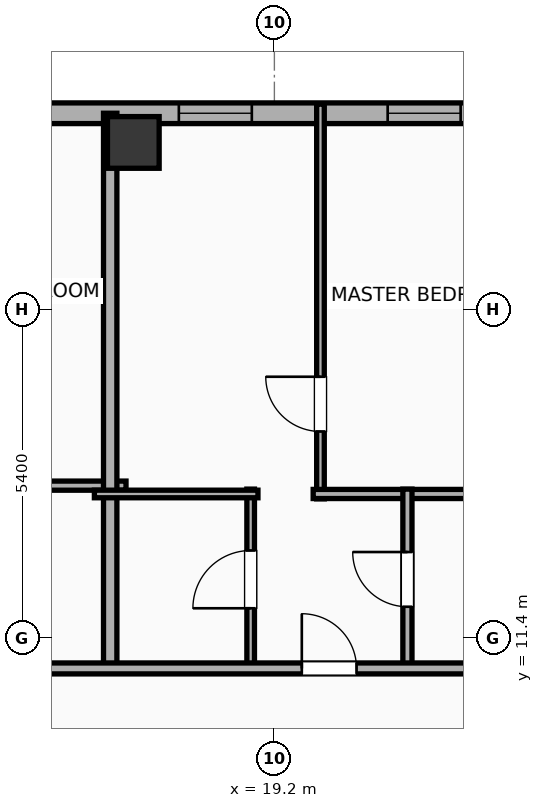
"""IFC4 building model, lengths in metres.
Left out: names, types, materials, properties, quantities, classifications, styles, units other than length and angle.
Written with IfcOpenShell. Run it as: python <this file> out.ifc"""

import sys

from ifc_helpers import new_model, si_unit, direction, frame, frame_2d, origin, origin_2d, place, context, subcontext, project, spatial, rectangle, hollow_rectangle, extrude, element, fill, save


model = new_model("IFC4")
c1 = context("Model", 3, precision=1e-05, world=origin(), true_north=direction((0.0, 1.0)))
c2 = subcontext(c1, "Body", "Model", "MODEL_VIEW")
j1 = project(units=[si_unit("LENGTHUNIT", "METRE"), si_unit("PLANEANGLEUNIT", "RADIAN")], contexts=[c1])
p1 = place(None, origin())
s1 = spatial("IfcSite", under=j1, at=p1, CompositionType="ELEMENT")
p2 = place(p1, origin())
s2 = spatial("IfcBuilding", under=s1, at=p2, CompositionType="ELEMENT")
p3 = place(p2, frame((0.0, 0.0, 243.1)))
s3 = spatial("IfcBuildingStorey", under=s2, at=p3, CompositionType="ELEMENT", Elevation=243.1)
p4 = place(p3, frame((16.88, 19.55, 0.0), z_axis=(0.0, 0.0, 1.0), x_axis=(1.0, 0.0, 0.0)))
e1 = element("IfcColumn", 1, at=p4, inside=s3, PredefinedType="COLUMN", context=c2, shape_type="SweptSolid", body=[
    extrude(hollow_rectangle(XDim=0.85, YDim=0.85, WallThickness=0.028, at=origin_2d()), origin(), (0.0, 0.0, 1.0), 3.9),
])
p5 = place(p3, frame((-22.783, 20.03, 0.0), z_axis=(0.0, 0.0, 1.0), x_axis=(1.0, 0.0, 0.0)))
e2 = element("IfcWall", 2, at=p5, inside=s3, PredefinedType="ELEMENTEDWALL", context=c2, shape_type="SweptSolid", body=[
    extrude(rectangle(XDim=49.566, YDim=0.34, at=frame_2d((24.783, 0.0))), origin(), (0.0, 0.0, 1.0), 3.65),
])
p6 = place(p5, frame((6.211, 0.0, 0.75)))
e3 = element("IfcOpeningElement", 3, at=p6, cuts=e2, PredefinedType="OPENING", context=c2, shape_type="SweptSolid", body=[
    extrude(rectangle(XDim=2.4, YDim=2.1, at=frame_2d((1.2, 1.05))), frame((0.0, 0.18, 0.0), z_axis=(0.0, -1.0, 0.0), x_axis=(1.0, 0.0, 0.0)), (0.0, 0.0, 1.0), 0.36),
])
p7 = place(p5, frame((25.233, 0.0, 0.75)))
e4 = element("IfcOpeningElement", 4, at=p7, cuts=e2, PredefinedType="OPENING", context=c2, shape_type="SweptSolid", body=[
    extrude(rectangle(XDim=2.4, YDim=2.1, at=frame_2d((1.2, 1.05))), frame((0.0, 0.18, 0.0), z_axis=(0.0, -1.0, 0.0), x_axis=(1.0, 0.0, 0.0)), (0.0, 0.0, 1.0), 0.36),
])
p8 = place(p5, frame((3.511, 0.0, 0.75)))
e5 = element("IfcOpeningElement", 5, at=p8, cuts=e2, PredefinedType="OPENING", context=c2, shape_type="SweptSolid", body=[
    extrude(rectangle(XDim=1.2, YDim=2.05, at=frame_2d((0.6, 1.025))), frame((0.0, 0.18, 0.0), z_axis=(0.0, -1.0, 0.0), x_axis=(1.0, 0.0, 0.0)), (0.0, 0.0, 1.0), 0.36),
])
p9 = place(p5, frame((10.728, 0.0, 0.75)))
e6 = element("IfcOpeningElement", 6, at=p9, cuts=e2, PredefinedType="OPENING", context=c2, shape_type="SweptSolid", body=[
    extrude(rectangle(XDim=1.2, YDim=2.05, at=frame_2d((0.6, 1.025))), frame((0.0, 0.18, 0.0), z_axis=(0.0, -1.0, 0.0), x_axis=(1.0, 0.0, 0.0)), (0.0, 0.0, 1.0), 0.36),
])
p10 = place(p5, frame((14.478, 0.0, 0.75)))
e7 = element("IfcOpeningElement", 7, at=p10, cuts=e2, PredefinedType="OPENING", context=c2, shape_type="SweptSolid", body=[
    extrude(rectangle(XDim=1.2, YDim=2.05, at=frame_2d((0.6, 1.025))), frame((0.0, 0.18, 0.0), z_axis=(0.0, -1.0, 0.0), x_axis=(1.0, 0.0, 0.0)), (0.0, 0.0, 1.0), 0.36),
])
p11 = place(p5, frame((17.988, 0.0, 0.75)))
e8 = element("IfcOpeningElement", 8, at=p11, cuts=e2, PredefinedType="OPENING", context=c2, shape_type="SweptSolid", body=[
    extrude(rectangle(XDim=1.2, YDim=2.05, at=frame_2d((0.6, 1.025))), frame((0.0, 0.18, 0.0), z_axis=(0.0, -1.0, 0.0), x_axis=(1.0, 0.0, 0.0)), (0.0, 0.0, 1.0), 0.36),
])
p12 = place(p5, frame((21.978, 0.0, 0.75)))
e9 = element("IfcOpeningElement", 9, at=p12, cuts=e2, PredefinedType="OPENING", context=c2, shape_type="SweptSolid", body=[
    extrude(rectangle(XDim=1.2, YDim=2.05, at=frame_2d((0.6, 1.025))), frame((0.0, 0.18, 0.0), z_axis=(0.0, -1.0, 0.0), x_axis=(1.0, 0.0, 0.0)), (0.0, 0.0, 1.0), 0.36),
])
p13 = place(p5, frame((30.373, 0.0, 0.75)))
e10 = element("IfcOpeningElement", 10, at=p13, cuts=e2, PredefinedType="OPENING", context=c2, shape_type="SweptSolid", body=[
    extrude(rectangle(XDim=0.85, YDim=2.05, at=frame_2d((0.425, 1.025))), frame((0.0, 0.18, 0.0), z_axis=(0.0, -1.0, 0.0), x_axis=(1.0, 0.0, 0.0)), (0.0, 0.0, 1.0), 0.36),
])
p14 = place(p5, frame((33.228, 0.0, 0.75)))
e11 = element("IfcOpeningElement", 11, at=p14, cuts=e2, PredefinedType="OPENING", context=c2, shape_type="SweptSolid", body=[
    extrude(rectangle(XDim=1.2, YDim=2.05, at=frame_2d((0.6, 1.025))), frame((0.0, 0.18, 0.0), z_axis=(0.0, -1.0, 0.0), x_axis=(1.0, 0.0, 0.0)), (0.0, 0.0, 1.0), 0.36),
])
p15 = place(p5, frame((36.978, 0.0, 0.75)))
e12 = element("IfcOpeningElement", 12, at=p15, cuts=e2, PredefinedType="OPENING", context=c2, shape_type="SweptSolid", body=[
    extrude(rectangle(XDim=1.2, YDim=2.05, at=frame_2d((0.6, 1.025))), frame((0.0, 0.18, 0.0), z_axis=(0.0, -1.0, 0.0), x_axis=(1.0, 0.0, 0.0)), (0.0, 0.0, 1.0), 0.36),
])
p16 = place(p5, frame((40.412, 0.0, 0.75)))
e13 = element("IfcOpeningElement", 13, at=p16, cuts=e2, PredefinedType="OPENING", context=c2, shape_type="SweptSolid", body=[
    extrude(rectangle(XDim=1.2, YDim=2.05, at=frame_2d((0.6, 1.025))), frame((0.0, 0.18, 0.0), z_axis=(0.0, -1.0, 0.0), x_axis=(1.0, 0.0, 0.0)), (0.0, 0.0, 1.0), 0.36),
])
p17 = place(p5, frame((43.846, 0.0, 0.75)))
e14 = element("IfcOpeningElement", 14, at=p17, cuts=e2, PredefinedType="OPENING", context=c2, shape_type="SweptSolid", body=[
    extrude(rectangle(XDim=1.2, YDim=2.05, at=frame_2d((0.6, 1.025))), frame((0.0, 0.18, 0.0), z_axis=(0.0, -1.0, 0.0), x_axis=(1.0, 0.0, 0.0)), (0.0, 0.0, 1.0), 0.36),
])
p18 = place(p5, frame((46.814, 0.0, 0.75)))
e15 = element("IfcOpeningElement", 15, at=p18, cuts=e2, PredefinedType="OPENING", context=c2, shape_type="SweptSolid", body=[
    extrude(rectangle(XDim=1.2, YDim=2.05, at=frame_2d((0.6, 1.025))), frame((0.0, 0.18, 0.0), z_axis=(0.0, -1.0, 0.0), x_axis=(1.0, 0.0, 0.0)), (0.0, 0.0, 1.0), 0.36),
])
p19 = place(p3, frame((12.97, 13.906, 0.0), z_axis=(0.0, 0.0, 1.0), x_axis=(1.0, 0.0, 0.0)))
e16 = element("IfcWall", 16, at=p19, inside=s3, PredefinedType="PLUMBINGWALL", context=c2, shape_type="SweptSolid", body=[
    extrude(rectangle(XDim=3.79, YDim=0.15, at=frame_2d((1.895, 0.0))), origin(), (0.0, 0.0, 1.0), 3.65),
])
p20 = place(p3, frame((16.5, 10.82, 0.0), z_axis=(0.0, 0.0, 1.0), x_axis=(0.0, 1.0, 0.0)))
e17 = element("IfcWall", 17, at=p20, inside=s3, PredefinedType="PARTITIONING", context=c2, shape_type="SweptSolid", body=[
    extrude(rectangle(XDim=9.21, YDim=0.22, at=frame_2d((4.605, 0.0))), origin(), (0.0, 0.0, 1.0), 3.09),
])
p21 = place(p3, frame((19.958, 13.689, 0.0), z_axis=(0.0, 0.0, 1.0), x_axis=(0.0, 1.0, 0.0)))
e18 = element("IfcWall", 18, at=p21, inside=s3, PredefinedType="PARTITIONING", context=c2, shape_type="SweptSolid", body=[
    extrude(rectangle(XDim=6.491, YDim=0.125, at=frame_2d((3.246, 0.0))), origin(), (0.0, 0.0, 1.0), 3.65),
])
p22 = place(p21, frame((1.108, 0.0, 0.0)))
e19 = element("IfcOpeningElement", 19, at=p22, cuts=e18, PredefinedType="OPENING", context=c2, shape_type="SweptSolid", body=[
    extrude(rectangle(XDim=0.9, YDim=2.05, at=frame_2d((0.45, 1.025))), frame((0.0, 0.073, 0.0), z_axis=(0.0, -1.0, 0.0), x_axis=(1.0, 0.0, 0.0)), (0.0, 0.0, 1.0), 0.145),
])
p23 = place(p3, frame((19.838, 13.769, 0.0), z_axis=(0.0, 0.0, 1.0), x_axis=(1.0, 0.0, 0.0)))
e20 = element("IfcWall", 20, at=p23, inside=s3, PredefinedType="PLUMBINGWALL", context=c2, shape_type="SweptSolid", body=[
    extrude(rectangle(XDim=3.79, YDim=0.15, at=frame_2d((1.895, 0.0))), origin(), (0.0, 0.0, 1.0), 3.65),
])
p24 = place(p3, frame((18.81, 10.88, 0.0), z_axis=(0.0, 0.0, 1.0), x_axis=(0.0, 1.0, 0.0)))
e21 = element("IfcWall", 21, at=p24, inside=s3, PredefinedType="PARTITIONING", context=c2, shape_type="SweptSolid", body=[
    extrude(rectangle(XDim=2.969, YDim=0.125, at=frame_2d((1.485, 0.0))), origin(), (0.0, 0.0, 1.0), 3.65),
])
p25 = place(p24, frame((1.01, 0.0, 0.0)))
e22 = element("IfcOpeningElement", 22, at=p25, cuts=e21, PredefinedType="OPENING", context=c2, shape_type="SweptSolid", body=[
    extrude(rectangle(XDim=0.95, YDim=2.05, at=frame_2d((0.475, 1.025))), frame((0.0, 0.073, 0.0), z_axis=(0.0, -1.0, 0.0), x_axis=(1.0, 0.0, 0.0)), (0.0, 0.0, 1.0), 0.145),
])
p26 = place(p3, frame((16.24, 13.769, 0.0), z_axis=(0.0, 0.0, 1.0), x_axis=(1.0, 0.0, 0.0)))
e23 = element("IfcWall", 23, at=p26, inside=s3, PredefinedType="PARTITIONING", context=c2, shape_type="SweptSolid", body=[
    extrude(rectangle(XDim=2.69, YDim=0.125, at=frame_2d((1.345, 0.0))), origin(), (0.0, 0.0, 1.0), 3.65),
])
p27 = place(p3, frame((21.388, 10.88, 0.0), z_axis=(0.0, 0.0, 1.0), x_axis=(0.0, 1.0, 0.0)))
e24 = element("IfcWall", 24, at=p27, inside=s3, PredefinedType="PLUMBINGWALL", context=c2, shape_type="SweptSolid", body=[
    extrude(rectangle(XDim=2.969, YDim=0.15, at=frame_2d((1.485, 0.0))), origin(), (0.0, 0.0, 1.0), 3.65),
])
p28 = place(p27, frame((1.034, 0.0, 0.0)))
e25 = element("IfcOpeningElement", 25, at=p28, cuts=e24, PredefinedType="OPENING", context=c2, shape_type="SweptSolid", body=[
    extrude(rectangle(XDim=0.9, YDim=2.05, at=frame_2d((0.45, 1.025))), frame((0.0, 0.085, 0.0), z_axis=(0.0, -1.0, 0.0), x_axis=(1.0, 0.0, 0.0)), (0.0, 0.0, 1.0), 0.17),
])
p29 = place(p3, frame((-26.23, 10.9, 0.0), z_axis=(0.0, 0.0, 1.0), x_axis=(1.0, 0.0, 0.0)))
e26 = element("IfcWall", 26, at=p29, inside=s3, PredefinedType="PARTITIONING", context=c2, shape_type="SweptSolid", body=[
    extrude(rectangle(XDim=56.46, YDim=0.18, at=frame_2d((28.23, 0.0))), origin(), (0.0, 0.0, 1.0), 3.65),
])
p30 = place(p29, frame((2.825, 0.0, 0.0)))
e27 = element("IfcOpeningElement", 27, at=p30, cuts=e26, PredefinedType="OPENING", context=c2, shape_type="SweptSolid", body=[
    extrude(rectangle(XDim=0.9, YDim=2.05, at=frame_2d((0.45, 1.025))), frame((0.0, 0.1, 0.0), z_axis=(0.0, -1.0, 0.0), x_axis=(1.0, 0.0, 0.0)), (0.0, 0.0, 1.0), 0.2),
])
p31 = place(p29, frame((10.135, 0.0, 0.0)))
e28 = element("IfcOpeningElement", 28, at=p31, cuts=e26, PredefinedType="OPENING", context=c2, shape_type="SweptSolid", body=[
    extrude(rectangle(XDim=1.15, YDim=2.05, at=frame_2d((0.575, 1.025))), frame((0.0, 0.1, 0.0), z_axis=(0.0, -1.0, 0.0), x_axis=(1.0, 0.0, 0.0)), (0.0, 0.0, 1.0), 0.2),
])
p32 = place(p29, frame((16.069, 0.0, 0.0)))
e29 = element("IfcOpeningElement", 29, at=p32, cuts=e26, PredefinedType="OPENING", context=c2, shape_type="SweptSolid", body=[
    extrude(rectangle(XDim=1.15, YDim=2.05, at=frame_2d((0.575, 1.025))), frame((0.0, 0.1, 0.0), z_axis=(0.0, -1.0, 0.0), x_axis=(1.0, 0.0, 0.0)), (0.0, 0.0, 1.0), 0.2),
])
p33 = place(p29, frame((23.567, 0.0, 0.0)))
e30 = element("IfcOpeningElement", 30, at=p33, cuts=e26, PredefinedType="OPENING", context=c2, shape_type="SweptSolid", body=[
    extrude(rectangle(XDim=1.15, YDim=2.05, at=frame_2d((0.575, 1.025))), frame((0.0, 0.1, 0.0), z_axis=(0.0, -1.0, 0.0), x_axis=(1.0, 0.0, 0.0)), (0.0, 0.0, 1.0), 0.2),
])
p34 = place(p29, frame((31.071, 0.0, 0.0)))
e31 = element("IfcOpeningElement", 31, at=p34, cuts=e26, PredefinedType="OPENING", context=c2, shape_type="SweptSolid", body=[
    extrude(rectangle(XDim=1.15, YDim=2.05, at=frame_2d((0.575, 1.025))), frame((0.0, 0.1, 0.0), z_axis=(0.0, -1.0, 0.0), x_axis=(1.0, 0.0, 0.0)), (0.0, 0.0, 1.0), 0.2),
])
p35 = place(p29, frame((38.569, 0.0, 0.0)))
e32 = element("IfcOpeningElement", 32, at=p35, cuts=e26, PredefinedType="OPENING", context=c2, shape_type="SweptSolid", body=[
    extrude(rectangle(XDim=1.15, YDim=2.05, at=frame_2d((0.575, 1.025))), frame((0.0, 0.1, 0.0), z_axis=(0.0, -1.0, 0.0), x_axis=(1.0, 0.0, 0.0)), (0.0, 0.0, 1.0), 0.2),
])
p36 = place(p29, frame((45.881, 0.0, 0.0)))
e33 = element("IfcOpeningElement", 33, at=p36, cuts=e26, PredefinedType="OPENING", context=c2, shape_type="SweptSolid", body=[
    extrude(rectangle(XDim=0.9, YDim=2.05, at=frame_2d((0.45, 1.025))), frame((0.0, 0.1, 0.0), z_axis=(0.0, -1.0, 0.0), x_axis=(1.0, 0.0, 0.0)), (0.0, 0.0, 1.0), 0.2),
])
p37 = place(p29, frame((52.775, 0.0, 0.0)))
e34 = element("IfcOpeningElement", 34, at=p37, cuts=e26, PredefinedType="OPENING", context=c2, shape_type="SweptSolid", body=[
    extrude(rectangle(XDim=0.9, YDim=2.05, at=frame_2d((0.45, 1.025))), frame((0.0, 0.1, 0.0), z_axis=(0.0, -1.0, 0.0), x_axis=(1.0, 0.0, 0.0)), (0.0, 0.0, 1.0), 0.2),
])
p38 = place(p16, origin())
e35 = element("IfcWindow", 35, at=p38, inside=s3, PartitioningType="SINGLE_PANEL", PredefinedType="WINDOW", context=c2, shape_type="SweptSolid", body=[
    extrude(rectangle(XDim=1.2, YDim=2.05, at=frame_2d((0.6, 1.025))), frame((0.0, 0.03, 0.0), z_axis=(0.0, -1.0, 0.0), x_axis=(1.0, 0.0, 0.0)), (0.0, 0.0, 1.0), 0.06),
])
fill(e13, e35)
p39 = place(p17, origin())
e36 = element("IfcWindow", 36, at=p39, inside=s3, PartitioningType="SINGLE_PANEL", PredefinedType="WINDOW", context=c2, shape_type="SweptSolid", body=[
    extrude(rectangle(XDim=1.2, YDim=2.05, at=frame_2d((0.6, 1.025))), frame((0.0, 0.03, 0.0), z_axis=(0.0, -1.0, 0.0), x_axis=(1.0, 0.0, 0.0)), (0.0, 0.0, 1.0), 0.06),
])
fill(e14, e36)
p40 = place(p22, origin())
e37 = element("IfcDoor", 37, at=p40, inside=s3, OperationType="SINGLE_SWING_RIGHT", PredefinedType="DOOR", context=c2, shape_type="SweptSolid", body=[
    extrude(rectangle(XDim=0.9, YDim=2.05, at=frame_2d((0.45, 1.025))), frame((0.0, 0.025, 0.0), z_axis=(0.0, -1.0, 0.0), x_axis=(1.0, 0.0, 0.0)), (0.0, 0.0, 1.0), 0.05),
])
fill(e19, e37)
p41 = place(p25, origin())
e38 = element("IfcDoor", 38, at=p41, inside=s3, OperationType="SINGLE_SWING_LEFT", PredefinedType="DOOR", context=c2, shape_type="SweptSolid", body=[
    extrude(rectangle(XDim=0.95, YDim=2.05, at=frame_2d((0.475, 1.025))), frame((0.0, 0.025, 0.0), z_axis=(0.0, -1.0, 0.0), x_axis=(1.0, 0.0, 0.0)), (0.0, 0.0, 1.0), 0.05),
])
fill(e22, e38)
p42 = place(p28, origin())
e39 = element("IfcDoor", 39, at=p42, inside=s3, OperationType="SINGLE_SWING_RIGHT", PredefinedType="DOOR", context=c2, shape_type="SweptSolid", body=[
    extrude(rectangle(XDim=0.9, YDim=2.05, at=frame_2d((0.45, 1.025))), frame((0.0, 0.025, 0.0), z_axis=(0.0, -1.0, 0.0), x_axis=(1.0, 0.0, 0.0)), (0.0, 0.0, 1.0), 0.05),
])
fill(e25, e39)
p43 = place(p36, origin())
e40 = element("IfcDoor", 40, at=p43, inside=s3, OperationType="SINGLE_SWING_LEFT", PredefinedType="DOOR", context=c2, shape_type="SweptSolid", body=[
    extrude(rectangle(XDim=0.9, YDim=2.05, at=frame_2d((0.45, 1.025))), frame((0.0, 0.025, 0.0), z_axis=(0.0, -1.0, 0.0), x_axis=(1.0, 0.0, 0.0)), (0.0, 0.0, 1.0), 0.05),
])
fill(e33, e40)
save(model, sys.argv[1])
